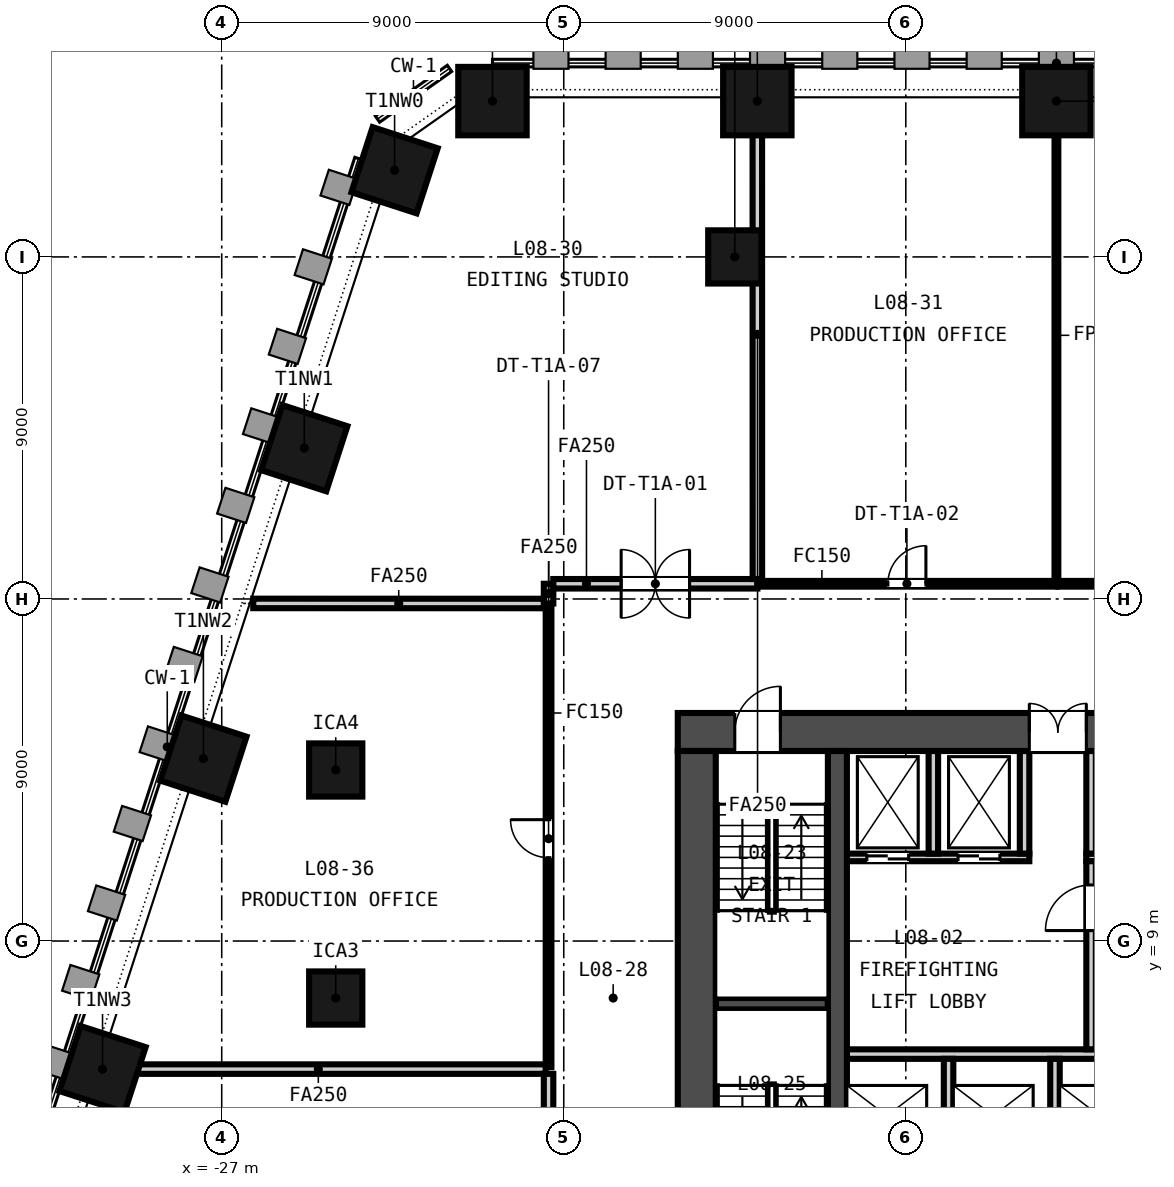
"""IFC4 building model, lengths in metres.
Left out: names, types, materials, properties, quantities, classifications, styles, units other than length and angle.
Written with IfcOpenShell. Run it as: python <this file> out.ifc"""

import sys

from ifc_helpers import new_model, si_unit, direction, frame, frame_2d, origin, origin_2d, place, context, subcontext, project, spatial, rectangle, extrude, element, fill, save


model = new_model("IFC4")
c1 = context("Model", 3, precision=1e-05, world=origin(), true_north=direction((0.0, 1.0)))
c2 = subcontext(c1, "Body", "Model", "MODEL_VIEW")
j1 = project(units=[si_unit("LENGTHUNIT", "METRE"), si_unit("PLANEANGLEUNIT", "RADIAN")], contexts=[c1])
p1 = place(None, origin())
s1 = spatial("IfcSite", under=j1, at=p1, CompositionType="ELEMENT")
p2 = place(p1, origin())
s2 = spatial("IfcBuilding", under=s1, at=p2, CompositionType="ELEMENT")
p3 = place(p2, frame((0.0, 0.0, 43.3)))
s3 = spatial("IfcBuildingStorey", under=s2, at=p3, CompositionType="ELEMENT", Elevation=43.3)
p4 = place(p3, frame((-15.0, 14.5, -0.15), z_axis=(0.0, 0.0, 1.0), x_axis=(1.0, 0.0, 0.0)))
e1 = element("IfcWall", 1, at=p4, inside=s3, PredefinedType="SOLIDWALL", context=c2, shape_type="SweptSolid", body=[
    extrude(rectangle(XDim=30.0, YDim=1.0, at=frame_2d((15.0, 0.0))), origin(), (0.0, 0.0, 1.0), 3.65),
])
p5 = place(p4, frame((9.25, 0.0, 0.15)))
e2 = element("IfcOpeningElement", 2, at=p5, cuts=e1, PredefinedType="OPENING", context=c2, shape_type="SweptSolid", body=[
    extrude(rectangle(XDim=1.5, YDim=2.1, at=frame_2d((0.75, 1.05))), frame((0.0, 0.51, 0.0), z_axis=(0.0, -1.0, 0.0), x_axis=(1.0, 0.0, 0.0)), (0.0, 0.0, 1.0), 1.02),
])
p6 = place(p4, frame((19.4, 0.0, 0.15)))
e3 = element("IfcOpeningElement", 3, at=p6, cuts=e1, PredefinedType="OPENING", context=c2, shape_type="SweptSolid", body=[
    extrude(rectangle(XDim=1.5, YDim=2.1, at=frame_2d((0.75, 1.05))), frame((0.0, 0.51, 0.0), z_axis=(0.0, -1.0, 0.0), x_axis=(1.0, 0.0, 0.0)), (0.0, 0.0, 1.0), 1.02),
])
p7 = place(p4, frame((1.5, 0.0, 0.15)))
e4 = element("IfcOpeningElement", 4, at=p7, cuts=e1, PredefinedType="OPENING", context=c2, shape_type="SweptSolid", body=[
    extrude(rectangle(XDim=1.2, YDim=2.1, at=frame_2d((0.6, 1.05))), frame((0.0, 0.51, 0.0), z_axis=(0.0, -1.0, 0.0), x_axis=(1.0, 0.0, 0.0)), (0.0, 0.0, 1.0), 1.02),
])
p8 = place(p4, frame((27.3, 0.0, 0.15)))
e5 = element("IfcOpeningElement", 5, at=p8, cuts=e1, PredefinedType="OPENING", context=c2, shape_type="SweptSolid", body=[
    extrude(rectangle(XDim=1.2, YDim=2.1, at=frame_2d((0.6, 1.05))), frame((0.0, 0.51, 0.0), z_axis=(0.0, -1.0, 0.0), x_axis=(1.0, 0.0, 0.0)), (0.0, 0.0, 1.0), 1.02),
])
p9 = place(p3, frame((-14.5, 1.0, -0.15), z_axis=(0.0, 0.0, 1.0), x_axis=(0.0, 1.0, 0.0)))
e6 = element("IfcWall", 6, at=p9, inside=s3, PredefinedType="SOLIDWALL", context=c2, shape_type="SweptSolid", body=[
    extrude(rectangle(XDim=13.0, YDim=1.0, at=frame_2d((6.5, 0.0))), origin(), (0.0, 0.0, 1.0), 3.65),
])
p10 = place(p3, frame((-10.8, 1.0, -0.15), z_axis=(0.0, 0.0, 1.0), x_axis=(0.0, 1.0, 0.0)))
e7 = element("IfcWall", 7, at=p10, inside=s3, PredefinedType="SOLIDWALL", context=c2, shape_type="SweptSolid", body=[
    extrude(rectangle(XDim=13.0, YDim=0.5, at=frame_2d((6.5, 0.0))), origin(), (0.0, 0.0, 1.0), 3.65),
])
for number, where, z_axis, x_axis in (
    (8, (-5.037, 31.1, -0.15), (0.0, 0.0, 1.0), (-1.0, 0.0, 0.0)),
    (9, (-12.907, 31.1, -0.15), (0.0, 0.0, 1.0), (-1.0, 0.0, 0.0)),
    (10, (-19.876, 31.1, -0.15), (0.0, 0.0, 1.0), (-1.0, 0.0, 0.0)),
    (11, (-22.451, 29.281, -0.15), (0.0, 0.0, 1.0), (-0.309, -0.951, 0.0)),
    (12, (-24.827, 21.968, -0.15), (0.0, 0.0, 1.0), (-0.309, -0.951, 0.0)),
    (13, (-27.482, 13.799, -0.15), (0.0, 0.0, 1.0), (-0.309, -0.951, 0.0)),
    (14, (-30.136, 5.63, -0.15), (0.0, 0.0, 1.0), (-0.309, -0.951, 0.0)),
):
    element("IfcColumn", number, at=place(p3, frame(where, z_axis=z_axis, x_axis=x_axis)), inside=s3, PredefinedType="COLUMN", context=c2, shape_type="SweptSolid", body=[
        extrude(rectangle(XDim=1.8, YDim=1.8, at=origin_2d()), origin(), (0.0, 0.0, 1.0), 3.65),
    ])
for number, where, z_axis, x_axis in (
    (15, (-24.0, 7.5, -0.15), (0.0, 0.0, 1.0), (1.0, 0.0, 0.0)),
    (16, (-24.0, 13.5, -0.15), (0.0, 0.0, 1.0), (1.0, 0.0, 0.0)),
    (17, (-13.5, 27.0, -0.15), (0.0, 0.0, 1.0), (1.0, 0.0, 0.0)),
):
    element("IfcColumn", number, at=place(p3, frame(where, z_axis=z_axis, x_axis=x_axis)), inside=s3, PredefinedType="COLUMN", context=c2, shape_type="SweptSolid", body=[
        extrude(rectangle(XDim=1.4, YDim=1.4, at=origin_2d()), origin(), (0.0, 0.0, 1.0), 3.65),
    ])
p11 = place(p3, frame((-10.55, 6.025, 0.0), z_axis=(0.0, 0.0, 1.0), x_axis=(1.0, 0.0, 0.0)))
e18 = element("IfcWall", 18, at=p11, inside=s3, PredefinedType="PARTITIONING", context=c2, shape_type="SweptSolid", body=[
    extrude(rectangle(XDim=21.1, YDim=0.25, at=frame_2d((10.55, 0.0))), origin(), (0.0, 0.0, 1.0), 3.5),
])
p12 = place(p3, frame((-4.125, 8.55, 0.0), z_axis=(0.0, 0.0, 1.0), x_axis=(1.0, 0.0, 0.0)))
e19 = element("IfcWall", 19, at=p12, inside=s3, PredefinedType="PARTITIONING", context=c2, shape_type="SweptSolid", body=[
    extrude(rectangle(XDim=14.675, YDim=0.2, at=frame_2d((7.337, 0.0))), origin(), (0.0, 0.0, 1.0), 3.5),
])
p13 = place(p12, frame((1.413, 0.0, 0.0)))
e20 = element("IfcOpeningElement", 20, at=p13, cuts=e19, PredefinedType="OPENING", context=c2, shape_type="SweptSolid", body=[
    extrude(rectangle(XDim=1.0, YDim=2.1, at=frame_2d((0.5, 1.05))), frame((0.0, 0.11, 0.0), z_axis=(0.0, -1.0, 0.0), x_axis=(1.0, 0.0, 0.0)), (0.0, 0.0, 1.0), 0.22),
])
p14 = place(p12, frame((5.0, 0.0, 0.0)))
e21 = element("IfcOpeningElement", 21, at=p14, cuts=e19, PredefinedType="OPENING", context=c2, shape_type="SweptSolid", body=[
    extrude(rectangle(XDim=1.0, YDim=2.1, at=frame_2d((0.5, 1.05))), frame((0.0, 0.11, 0.0), z_axis=(0.0, -1.0, 0.0), x_axis=(1.0, 0.0, 0.0)), (0.0, 0.0, 1.0), 0.22),
])
p15 = place(p12, frame((9.613, 0.0, 0.0)))
e22 = element("IfcOpeningElement", 22, at=p15, cuts=e19, PredefinedType="OPENING", context=c2, shape_type="SweptSolid", body=[
    extrude(rectangle(XDim=1.0, YDim=2.1, at=frame_2d((0.5, 1.05))), frame((0.0, 0.11, 0.0), z_axis=(0.0, -1.0, 0.0), x_axis=(1.0, 0.0, 0.0)), (0.0, 0.0, 1.0), 0.22),
])
p16 = place(p12, frame((13.475, 0.0, 0.0)))
e23 = element("IfcOpeningElement", 23, at=p16, cuts=e19, PredefinedType="OPENING", context=c2, shape_type="SweptSolid", body=[
    extrude(rectangle(XDim=0.9, YDim=2.1, at=frame_2d((0.45, 1.05))), frame((0.0, 0.11, 0.0), z_axis=(0.0, -1.0, 0.0), x_axis=(1.0, 0.0, 0.0)), (0.0, 0.0, 1.0), 0.22),
])
p17 = place(p3, frame((-10.55, 11.2, 0.0), z_axis=(0.0, 0.0, 1.0), x_axis=(1.0, 0.0, 0.0)))
e24 = element("IfcWall", 24, at=p17, inside=s3, PredefinedType="PARTITIONING", context=c2, shape_type="SweptSolid", body=[
    extrude(rectangle(XDim=4.8, YDim=0.2, at=frame_2d((2.4, 0.0))), origin(), (0.0, 0.0, 1.0), 3.5),
])
p18 = place(p17, frame((0.525, 0.0, 0.0)))
e25 = element("IfcOpeningElement", 25, at=p18, cuts=e24, PredefinedType="OPENING", context=c2, shape_type="SweptSolid", body=[
    extrude(rectangle(XDim=1.1, YDim=2.1, at=frame_2d((0.55, 1.05))), frame((0.0, 0.11, 0.0), z_axis=(0.0, -1.0, 0.0), x_axis=(1.0, 0.0, 0.0)), (0.0, 0.0, 1.0), 0.22),
])
p19 = place(p17, frame((2.925, 0.0, 0.0)))
e26 = element("IfcOpeningElement", 26, at=p19, cuts=e24, PredefinedType="OPENING", context=c2, shape_type="SweptSolid", body=[
    extrude(rectangle(XDim=1.1, YDim=2.1, at=frame_2d((0.55, 1.05))), frame((0.0, 0.11, 0.0), z_axis=(0.0, -1.0, 0.0), x_axis=(1.0, 0.0, 0.0)), (0.0, 0.0, 1.0), 0.22),
])
p20 = place(p3, frame((-4.25, 11.2, 0.0), z_axis=(0.0, 0.0, 1.0), x_axis=(1.0, 0.0, 0.0)))
e27 = element("IfcWall", 27, at=p20, inside=s3, PredefinedType="PARTITIONING", context=c2, shape_type="SweptSolid", body=[
    extrude(rectangle(XDim=8.65, YDim=0.2, at=frame_2d((4.325, 0.0))), origin(), (0.0, 0.0, 1.0), 3.5),
])
p21 = place(p20, frame((0.825, 0.0, 0.0)))
e28 = element("IfcOpeningElement", 28, at=p21, cuts=e27, PredefinedType="OPENING", context=c2, shape_type="SweptSolid", body=[
    extrude(rectangle(XDim=1.4, YDim=2.1, at=frame_2d((0.7, 1.05))), frame((0.0, 0.11, 0.0), z_axis=(0.0, -1.0, 0.0), x_axis=(1.0, 0.0, 0.0)), (0.0, 0.0, 1.0), 0.22),
])
p22 = place(p20, frame((3.625, 0.0, 0.0)))
e29 = element("IfcOpeningElement", 29, at=p22, cuts=e27, PredefinedType="OPENING", context=c2, shape_type="SweptSolid", body=[
    extrude(rectangle(XDim=1.4, YDim=2.1, at=frame_2d((0.7, 1.05))), frame((0.0, 0.11, 0.0), z_axis=(0.0, -1.0, 0.0), x_axis=(1.0, 0.0, 0.0)), (0.0, 0.0, 1.0), 0.22),
])
p23 = place(p3, frame((-4.125, 6.15, 0.0), z_axis=(0.0, 0.0, 1.0), x_axis=(0.0, 1.0, 0.0)))
e30 = element("IfcWall", 30, at=p23, inside=s3, PredefinedType="PARTITIONING", context=c2, shape_type="SweptSolid", body=[
    extrude(rectangle(XDim=4.95, YDim=0.25, at=frame_2d((2.475, 0.0))), origin(), (0.0, 0.0, 1.0), 3.5),
])
p24 = place(p23, frame((3.125, 0.0, 0.0)))
e31 = element("IfcOpeningElement", 31, at=p24, cuts=e30, PredefinedType="OPENING", context=c2, shape_type="SweptSolid", body=[
    extrude(rectangle(XDim=1.2, YDim=2.1, at=frame_2d((0.6, 1.05))), frame((0.0, 0.135, 0.0), z_axis=(0.0, -1.0, 0.0), x_axis=(1.0, 0.0, 0.0)), (0.0, 0.0, 1.0), 0.27),
])
for number, where, z_axis, x_axis in (
    (32, (-7.875, 3.6, 0.0), (0.0, 0.0, 1.0), (0.0, 1.0, 0.0)),
    (33, (-5.075, 3.6, 0.0), (0.0, 0.0, 1.0), (0.0, 1.0, 0.0)),
):
    element("IfcWall", number, at=place(p3, frame(where, z_axis=z_axis, x_axis=x_axis)), inside=s3, PredefinedType="PARTITIONING", context=c2, shape_type="SweptSolid", body=[
        extrude(rectangle(XDim=2.3, YDim=0.25, at=frame_2d((1.15, 0.0))), origin(), (0.0, 0.0, 1.0), 3.5),
    ])
for number, where, z_axis, x_axis in (
    (34, (-8.275, 11.3, 0.0), (0.0, 0.0, 1.0), (0.0, 1.0, 0.0)),
    (35, (-5.875, 11.3, 0.0), (0.0, 0.0, 1.0), (0.0, 1.0, 0.0)),
    (36, (-4.125, 11.3, 0.0), (0.0, 0.0, 1.0), (0.0, 1.0, 0.0)),
):
    element("IfcWall", number, at=place(p3, frame(where, z_axis=z_axis, x_axis=x_axis)), inside=s3, PredefinedType="PARTITIONING", context=c2, shape_type="SweptSolid", body=[
        extrude(rectangle(XDim=2.7, YDim=0.25, at=frame_2d((1.35, 0.0))), origin(), (0.0, 0.0, 1.0), 3.5),
    ])
p25 = place(p3, frame((-14.0, 7.35, -0.15), z_axis=(0.0, 0.0, 1.0), x_axis=(1.0, 0.0, 0.0)))
e37 = element("IfcWall", 37, at=p25, inside=s3, PredefinedType="SOLIDWALL", context=c2, shape_type="SweptSolid", body=[
    extrude(rectangle(XDim=2.95, YDim=0.3, at=frame_2d((1.475, 0.0))), origin(), (0.0, 0.0, 1.0), 3.65),
])
p26 = place(p3, frame((-18.4, 17.881, 0.0), z_axis=(0.0, 0.0, 1.0), x_axis=(0.0, 1.0, 0.0)))
e38 = element("IfcWall", 38, at=p26, inside=s3, PredefinedType="PARTITIONING", context=c2, shape_type="SweptSolid", body=[
    extrude(rectangle(XDim=0.519, YDim=0.25, at=frame_2d((0.259, 0.0))), origin(), (0.0, 0.0, 1.0), 2.741),
])
p27 = place(p3, frame((-18.275, 18.4, 0.0), z_axis=(0.0, 0.0, 1.0), x_axis=(1.0, 0.0, 0.0)))
e39 = element("IfcWall", 39, at=p27, inside=s3, PredefinedType="PARTITIONING", context=c2, shape_type="SweptSolid", body=[
    extrude(rectangle(XDim=5.37, YDim=0.25, at=frame_2d((2.685, 0.0))), origin(), (0.0, 0.0, 1.0), 2.741),
])
p28 = place(p27, frame((1.785, 0.0, 0.0)))
e40 = element("IfcOpeningElement", 40, at=p28, cuts=e39, PredefinedType="OPENING", context=c2, shape_type="SweptSolid", body=[
    extrude(rectangle(XDim=1.8, YDim=2.1, at=frame_2d((0.9, 1.05))), frame((0.0, 0.135, 0.0), z_axis=(0.0, -1.0, 0.0), x_axis=(1.0, 0.0, 0.0)), (0.0, 0.0, 1.0), 0.27),
])
p29 = place(p3, frame((-26.17, 17.883, 0.0), z_axis=(0.0, 0.0, 1.0), x_axis=(0.999999975014, -0.00022354218, 0.0)))
e41 = element("IfcWall", 41, at=p29, inside=s3, PredefinedType="PARTITIONING", context=c2, shape_type="SweptSolid", body=[
    extrude(rectangle(XDim=7.645, YDim=0.25, at=frame_2d((3.823, 0.0))), origin(), (0.0, 0.0, 1.0), 2.741),
])
p30 = place(p3, frame((-12.905, 18.4, 0.0), z_axis=(0.0, 0.0, 1.0), x_axis=(1.0, 0.0, 0.0)))
e42 = element("IfcWall", 42, at=p30, inside=s3, PredefinedType="PARTITIONING", context=c2, shape_type="SweptSolid", body=[
    extrude(rectangle(XDim=7.868, YDim=0.15, at=frame_2d((3.934, 0.0))), origin(), (0.0, 0.0, 1.0), 2.741),
])
p31 = place(p30, frame((3.434, 0.0, 0.0)))
e43 = element("IfcOpeningElement", 43, at=p31, cuts=e42, PredefinedType="OPENING", context=c2, shape_type="SweptSolid", body=[
    extrude(rectangle(XDim=1.0, YDim=2.1, at=frame_2d((0.5, 1.05))), frame((0.0, 0.085, 0.0), z_axis=(0.0, -1.0, 0.0), x_axis=(1.0, 0.0, 0.0)), (0.0, 0.0, 1.0), 0.17),
])
p32 = place(p3, frame((-12.907, 31.4, 0.0), z_axis=(0.0, 0.0, 1.0), x_axis=(0.000151699027, -0.999999988494, 0.0)))
e44 = element("IfcWall", 44, at=p32, inside=s3, PredefinedType="PARTITIONING", context=c2, shape_type="SweptSolid", body=[
    extrude(rectangle(XDim=12.875, YDim=0.25, at=frame_2d((6.438, 0.0))), origin(), (0.0, 0.0, 1.0), 2.741),
])
p33 = place(p3, frame((-5.037, 18.475, 0.0), z_axis=(0.0, 0.0, 1.0), x_axis=(0.0, 1.0, 0.0)))
e45 = element("IfcWall", 45, at=p33, inside=s3, PredefinedType="PARTITIONING", context=c2, shape_type="SweptSolid", body=[
    extrude(rectangle(XDim=12.925, YDim=0.1, at=frame_2d((6.462, 0.0))), origin(), (0.0, 0.0, 1.0), 2.741),
])
p34 = place(p3, frame((-4.987, 18.4, 0.0), z_axis=(0.0, 0.0, 1.0), x_axis=(1.0, 0.0, 0.0)))
e46 = element("IfcWall", 46, at=p34, inside=s3, PredefinedType="PARTITIONING", context=c2, shape_type="SweptSolid", body=[
    extrude(rectangle(XDim=7.819, YDim=0.15, at=frame_2d((3.91, 0.0))), origin(), (0.0, 0.0, 1.0), 2.741),
])
p35 = place(p34, frame((3.409, 0.0, 0.0)))
e47 = element("IfcOpeningElement", 47, at=p35, cuts=e46, PredefinedType="OPENING", context=c2, shape_type="SweptSolid", body=[
    extrude(rectangle(XDim=1.0, YDim=2.1, at=frame_2d((0.5, 1.05))), frame((0.0, 0.085, 0.0), z_axis=(0.0, -1.0, 0.0), x_axis=(1.0, 0.0, 0.0)), (0.0, 0.0, 1.0), 0.17),
])
p36 = place(p3, frame((-18.4, 5.68, 0.0), z_axis=(0.0, 0.0, 1.0), x_axis=(0.0, 1.0, 0.0)))
e48 = element("IfcWall", 48, at=p36, inside=s3, PredefinedType="PARTITIONING", context=c2, shape_type="SweptSolid", body=[
    extrude(rectangle(XDim=12.076, YDim=0.15, at=frame_2d((6.038, 0.0))), origin(), (0.0, 0.0, 1.0), 2.741),
])
p37 = place(p36, frame((5.513, 0.0, 0.0)))
e49 = element("IfcOpeningElement", 49, at=p37, cuts=e48, PredefinedType="OPENING", context=c2, shape_type="SweptSolid", body=[
    extrude(rectangle(XDim=1.0, YDim=2.1, at=frame_2d((0.5, 1.05))), frame((0.0, 0.085, 0.0), z_axis=(0.0, -1.0, 0.0), x_axis=(1.0, 0.0, 0.0)), (0.0, 0.0, 1.0), 0.17),
])
p38 = place(p3, frame((-30.451, 5.63, 0.0), z_axis=(0.0, 0.0, 1.0), x_axis=(1.0, 0.0, 0.0)))
e50 = element("IfcWall", 50, at=p38, inside=s3, PredefinedType="PARTITIONING", context=c2, shape_type="SweptSolid", body=[
    extrude(rectangle(XDim=11.976, YDim=0.25, at=frame_2d((5.988, 0.0))), origin(), (0.0, 0.0, 1.0), 2.741),
])
p39 = place(p3, frame((-18.4, -4.398, 0.0), z_axis=(0.0, 0.0, 1.0), x_axis=(0.0, 1.0, 0.0)))
e51 = element("IfcWall", 51, at=p39, inside=s3, PredefinedType="PARTITIONING", context=c2, shape_type="SweptSolid", body=[
    extrude(rectangle(XDim=9.903, YDim=0.25, at=frame_2d((4.951, 0.0))), origin(), (0.0, 0.0, 1.0), 2.741),
])
p40 = place(p39, frame((4.052, 0.0, 0.0)))
e52 = element("IfcOpeningElement", 52, at=p40, cuts=e51, PredefinedType="OPENING", context=c2, shape_type="SweptSolid", body=[
    extrude(rectangle(XDim=1.8, YDim=2.1, at=frame_2d((0.9, 1.05))), frame((0.0, 0.135, 0.0), z_axis=(0.0, -1.0, 0.0), x_axis=(1.0, 0.0, 0.0)), (0.0, 0.0, 1.0), 0.27),
])
p41 = place(p24, origin())
e53 = element("IfcDoor", 53, at=p41, inside=s3, OperationType="SINGLE_SWING_LEFT", PredefinedType="DOOR", context=c2, shape_type="SweptSolid", body=[
    extrude(rectangle(XDim=1.2, YDim=2.1, at=frame_2d((0.6, 1.05))), frame((0.0, 0.025, 0.0), z_axis=(0.0, -1.0, 0.0), x_axis=(1.0, 0.0, 0.0)), (0.0, 0.0, 1.0), 0.05),
])
fill(e31, e53)
p42 = place(p18, origin())
e54 = element("IfcDoor", 54, at=p42, inside=s3, OperationType="DOUBLE_DOOR_SLIDING", PredefinedType="DOOR", context=c2, shape_type="SweptSolid", body=[
    extrude(rectangle(XDim=1.1, YDim=2.1, at=frame_2d((0.55, 1.05))), frame((0.0, 0.025, 0.0), z_axis=(0.0, -1.0, 0.0), x_axis=(1.0, 0.0, 0.0)), (0.0, 0.0, 1.0), 0.05),
])
fill(e25, e54)
p43 = place(p19, origin())
e55 = element("IfcDoor", 55, at=p43, inside=s3, OperationType="DOUBLE_DOOR_SLIDING", PredefinedType="DOOR", context=c2, shape_type="SweptSolid", body=[
    extrude(rectangle(XDim=1.1, YDim=2.1, at=frame_2d((0.55, 1.05))), frame((0.0, 0.025, 0.0), z_axis=(0.0, -1.0, 0.0), x_axis=(1.0, 0.0, 0.0)), (0.0, 0.0, 1.0), 0.05),
])
fill(e26, e55)
p44 = place(p5, origin())
e56 = element("IfcDoor", 56, at=p44, inside=s3, OperationType="DOUBLE_DOOR_SINGLE_SWING", PredefinedType="DOOR", context=c2, shape_type="SweptSolid", body=[
    extrude(rectangle(XDim=1.5, YDim=2.1, at=frame_2d((0.75, 1.05))), frame((0.0, 0.025, 0.0), z_axis=(0.0, -1.0, 0.0), x_axis=(1.0, 0.0, 0.0)), (0.0, 0.0, 1.0), 0.05),
])
fill(e2, e56)
p45 = place(p7, origin())
e57 = element("IfcDoor", 57, at=p45, inside=s3, OperationType="SINGLE_SWING_RIGHT", PredefinedType="DOOR", context=c2, shape_type="SweptSolid", body=[
    extrude(rectangle(XDim=1.2, YDim=2.1, at=frame_2d((0.6, 1.05))), frame((0.0, 0.025, 0.0), z_axis=(0.0, -1.0, 0.0), x_axis=(1.0, 0.0, 0.0)), (0.0, 0.0, 1.0), 0.05),
])
fill(e4, e57)
p46 = place(p28, origin())
e58 = element("IfcDoor", 58, at=p46, inside=s3, OperationType="DOUBLE_DOOR_DOUBLE_SWING", PredefinedType="DOOR", context=c2, shape_type="SweptSolid", body=[
    extrude(rectangle(XDim=1.8, YDim=2.1, at=frame_2d((0.9, 1.05))), frame((0.0, 0.025, 0.0), z_axis=(0.0, -1.0, 0.0), x_axis=(1.0, 0.0, 0.0)), (0.0, 0.0, 1.0), 0.05),
])
fill(e40, e58)
p47 = place(p31, origin())
e59 = element("IfcDoor", 59, at=p47, inside=s3, OperationType="SINGLE_SWING_RIGHT", PredefinedType="DOOR", context=c2, shape_type="SweptSolid", body=[
    extrude(rectangle(XDim=1.0, YDim=2.1, at=frame_2d((0.5, 1.05))), frame((0.0, 0.025, 0.0), z_axis=(0.0, -1.0, 0.0), x_axis=(1.0, 0.0, 0.0)), (0.0, 0.0, 1.0), 0.05),
])
fill(e43, e59)
p48 = place(p37, origin())
e60 = element("IfcDoor", 60, at=p48, inside=s3, OperationType="SINGLE_SWING_RIGHT", PredefinedType="DOOR", context=c2, shape_type="SweptSolid", body=[
    extrude(rectangle(XDim=1.0, YDim=2.1, at=frame_2d((0.5, 1.05))), frame((0.0, 0.025, 0.0), z_axis=(0.0, -1.0, 0.0), x_axis=(1.0, 0.0, 0.0)), (0.0, 0.0, 1.0), 0.05),
])
fill(e49, e60)
save(model, sys.argv[1])
